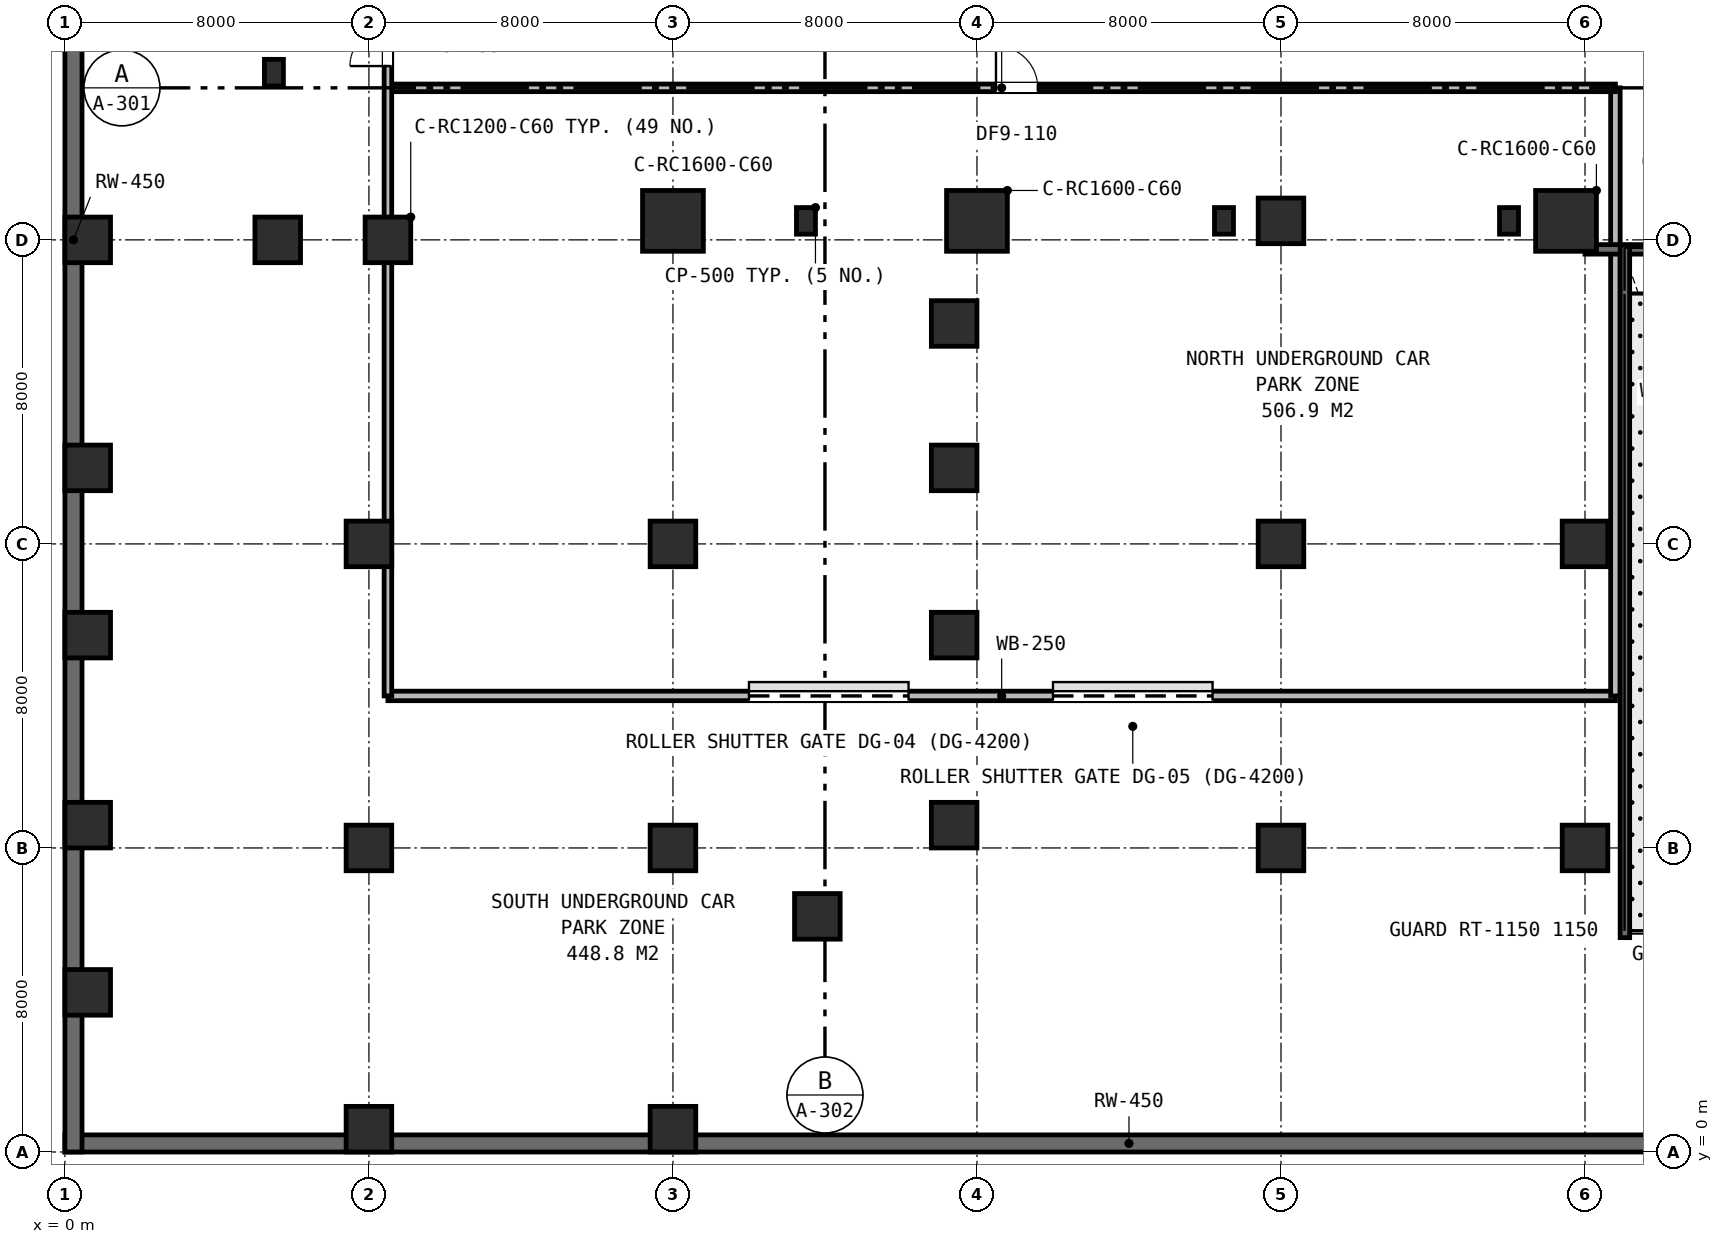
"""IFC4 building model, lengths in metres.
Left out: names, types, materials, properties, quantities, classifications, styles, units other than length and angle.
Written with IfcOpenShell. Run it as: python <this file> out.ifc"""

import sys

from ifc_helpers import new_model, si_unit, direction, frame, frame_2d, origin, origin_2d, place, context, subcontext, project, spatial, rectangle, extrude, element, fill, save


model = new_model("IFC4")
c1 = context("Model", 3, precision=1e-05, world=origin(), true_north=direction((0.0, 1.0)))
c2 = subcontext(c1, "Body", "Model", "MODEL_VIEW")
j1 = project(units=[si_unit("LENGTHUNIT", "METRE"), si_unit("PLANEANGLEUNIT", "RADIAN")], contexts=[c1])
p1 = place(None, origin())
s1 = spatial("IfcSite", under=j1, at=p1, CompositionType="ELEMENT")
p2 = place(p1, origin())
s2 = spatial("IfcBuilding", under=s1, at=p2, CompositionType="ELEMENT")
p3 = place(p2, frame((0.0, 0.0, -5.6)))
s3 = spatial("IfcBuildingStorey", under=s2, at=p3, CompositionType="ELEMENT", Elevation=-5.6)
p4 = place(p3, frame((0.0, 0.225, 0.0), z_axis=(0.0, 0.0, 1.0), x_axis=(1.0, 0.0, 0.0)))
e1 = element("IfcWall", 1, at=p4, inside=s3, PredefinedType="USERDEFINED", context=c2, shape_type="SweptSolid", body=[
    extrude(rectangle(XDim=56.0, YDim=0.45, at=frame_2d((28.0, 0.0))), origin(), (0.0, 0.0, 1.0), 5.6),
])
p5 = place(p3, frame((0.225, 0.0, 0.0), z_axis=(0.0, 0.0, 1.0), x_axis=(0.0, 1.0, 0.0)))
e2 = element("IfcWall", 2, at=p5, inside=s3, PredefinedType="USERDEFINED", context=c2, shape_type="SweptSolid", body=[
    extrude(rectangle(XDim=48.0, YDim=0.45, at=frame_2d((24.0, 0.0))), origin(), (0.0, 0.0, 1.0), 5.6),
])
p6 = place(p3, frame((8.5, 24.0, 0.0), z_axis=(0.0, 0.0, 1.0), x_axis=(1.0, 0.0, 0.0)))
e3 = element("IfcColumn", 3, at=p6, inside=s3, PredefinedType="COLUMN", context=c2, shape_type="SweptSolid", body=[
    extrude(rectangle(XDim=1.2, YDim=1.2, at=origin_2d()), origin(), (0.0, 0.0, 1.0), 5.6),
])
for number, where, z_axis, x_axis in (
    (4, (16.0, 24.5, 0.0), (0.0, 0.0, 1.0), (1.0, 0.0, 0.0)),
    (5, (24.0, 24.5, 0.0), (0.0, 0.0, 1.0), (1.0, 0.0, 0.0)),
):
    element("IfcColumn", number, at=place(p3, frame(where, z_axis=z_axis, x_axis=x_axis)), inside=s3, PredefinedType="COLUMN", context=c2, shape_type="SweptSolid", body=[
        extrude(rectangle(XDim=1.6, YDim=1.6, at=origin_2d()), origin(), (0.0, 0.0, 1.0), 5.6),
    ])
p7 = place(p3, frame((32.0, 24.5, 0.0), z_axis=(0.0, 0.0, 1.0), x_axis=(1.0, 0.0, 0.0)))
e6 = element("IfcColumn", 6, at=p7, inside=s3, PredefinedType="COLUMN", context=c2, shape_type="SweptSolid", body=[
    extrude(rectangle(XDim=1.2, YDim=1.2, at=origin_2d()), origin(), (0.0, 0.0, 1.0), 5.6),
])
p8 = place(p3, frame((39.5, 24.5, 0.0), z_axis=(0.0, 0.0, 1.0), x_axis=(1.0, 0.0, 0.0)))
e7 = element("IfcColumn", 7, at=p8, inside=s3, PredefinedType="COLUMN", context=c2, shape_type="SweptSolid", body=[
    extrude(rectangle(XDim=1.6, YDim=1.6, at=origin_2d()), origin(), (0.0, 0.0, 1.0), 5.6),
])
for number, where, z_axis, x_axis in (
    (8, (5.6, 24.0, 0.0), (0.0, 0.0, 1.0), (1.0, 0.0, 0.0)),
    (9, (0.6, 24.0, 0.0), (0.0, 0.0, 1.0), (1.0, 0.0, 0.0)),
    (10, (0.6, 8.6, 0.0), (0.0, 0.0, 1.0), (1.0, 0.0, 0.0)),
    (11, (0.6, 13.6, 0.0), (0.0, 0.0, 1.0), (1.0, 0.0, 0.0)),
    (12, (0.6, 18.0, 0.0), (0.0, 0.0, 1.0), (1.0, 0.0, 0.0)),
    (13, (0.6, 4.2, 0.0), (0.0, 0.0, 1.0), (1.0, 0.0, 0.0)),
    (14, (8.0, 0.6, 0.0), (0.0, 0.0, 1.0), (1.0, 0.0, 0.0)),
    (15, (16.0, 0.6, 0.0), (0.0, 0.0, 1.0), (1.0, 0.0, 0.0)),
    (16, (19.8, 6.2, 0.0), (0.0, 0.0, 1.0), (1.0, 0.0, 0.0)),
    (17, (23.4, 8.6, 0.0), (0.0, 0.0, 1.0), (1.0, 0.0, 0.0)),
    (18, (23.4, 13.6, 0.0), (0.0, 0.0, 1.0), (1.0, 0.0, 0.0)),
    (19, (23.4, 18.0, 0.0), (0.0, 0.0, 1.0), (1.0, 0.0, 0.0)),
    (20, (23.4, 21.8, 0.0), (0.0, 0.0, 1.0), (1.0, 0.0, 0.0)),
    (21, (8.0, 8.0, 0.0), (0.0, 0.0, 1.0), (1.0, 0.0, 0.0)),
    (22, (16.0, 8.0, 0.0), (0.0, 0.0, 1.0), (1.0, 0.0, 0.0)),
    (23, (32.0, 8.0, 0.0), (0.0, 0.0, 1.0), (1.0, 0.0, 0.0)),
    (24, (40.0, 8.0, 0.0), (0.0, 0.0, 1.0), (1.0, 0.0, 0.0)),
    (25, (8.0, 16.0, 0.0), (0.0, 0.0, 1.0), (1.0, 0.0, 0.0)),
    (26, (16.0, 16.0, 0.0), (0.0, 0.0, 1.0), (1.0, 0.0, 0.0)),
    (27, (32.0, 16.0, 0.0), (0.0, 0.0, 1.0), (1.0, 0.0, 0.0)),
    (28, (40.0, 16.0, 0.0), (0.0, 0.0, 1.0), (1.0, 0.0, 0.0)),
):
    element("IfcColumn", number, at=place(p3, frame(where, z_axis=z_axis, x_axis=x_axis)), inside=s3, PredefinedType="COLUMN", context=c2, shape_type="SweptSolid", body=[
        extrude(rectangle(XDim=1.2, YDim=1.2, at=origin_2d()), origin(), (0.0, 0.0, 1.0), 5.6),
    ])
p9 = place(p3, frame((8.5, 12.0, 0.0), z_axis=(0.0, 0.0, 1.0), x_axis=(1.0, 0.0, 0.0)))
e29 = element("IfcWall", 29, at=p9, inside=s3, PredefinedType="STANDARD", context=c2, shape_type="SweptSolid", body=[
    extrude(rectangle(XDim=32.3, YDim=0.25, at=frame_2d((16.15, 0.0))), origin(), (0.0, 0.0, 1.0), 5.27),
])
p10 = place(p9, frame((9.5, 0.0, 0.0)))
e30 = element("IfcOpeningElement", 30, at=p10, cuts=e29, PredefinedType="OPENING", context=c2, shape_type="SweptSolid", body=[
    extrude(rectangle(XDim=4.2, YDim=2.95, at=frame_2d((2.1, 1.475))), frame((0.0, 0.135, 0.0), z_axis=(0.0, -1.0, 0.0), x_axis=(1.0, 0.0, 0.0)), (0.0, 0.0, 1.0), 0.27),
])
p11 = place(p9, frame((17.5, 0.0, 0.0)))
e31 = element("IfcOpeningElement", 31, at=p11, cuts=e29, PredefinedType="OPENING", context=c2, shape_type="SweptSolid", body=[
    extrude(rectangle(XDim=4.2, YDim=2.95, at=frame_2d((2.1, 1.475))), frame((0.0, 0.135, 0.0), z_axis=(0.0, -1.0, 0.0), x_axis=(1.0, 0.0, 0.0)), (0.0, 0.0, 1.0), 0.27),
])
p12 = place(p3, frame((40.8, 12.0, 0.0), z_axis=(0.0, 0.0, 1.0), x_axis=(0.0, 1.0, 0.0)))
e32 = element("IfcWall", 32, at=p12, inside=s3, PredefinedType="STANDARD", context=c2, shape_type="SweptSolid", body=[
    extrude(rectangle(XDim=16.0, YDim=0.25, at=frame_2d((8.0, 0.0))), origin(), (0.0, 0.0, 1.0), 5.27),
])
p13 = place(p3, frame((8.5, 28.0, 0.0), z_axis=(0.0, 0.0, 1.0), x_axis=(1.0, 0.0, 0.0)))
e33 = element("IfcWall", 33, at=p13, inside=s3, PredefinedType="PARTITIONING", context=c2, shape_type="SweptSolid", body=[
    extrude(rectangle(XDim=32.3, YDim=0.2, at=frame_2d((16.15, 0.0))), origin(), (0.0, 0.0, 1.0), 4.66),
])
p14 = place(p13, frame((16.0, 0.0, 0.0)))
e34 = element("IfcOpeningElement", 34, at=p14, cuts=e33, PredefinedType="OPENING", context=c2, shape_type="SweptSolid", body=[
    extrude(rectangle(XDim=1.1, YDim=2.15, at=frame_2d((0.55, 1.075))), frame((0.0, 0.11, 0.0), z_axis=(0.0, -1.0, 0.0), x_axis=(1.0, 0.0, 0.0)), (0.0, 0.0, 1.0), 0.22),
])
p15 = place(p3, frame((8.5, 12.0, 0.0), z_axis=(0.0, 0.0, 1.0), x_axis=(0.0, 1.0, 0.0)))
e35 = element("IfcWall", 35, at=p15, inside=s3, PredefinedType="PARTITIONING", context=c2, shape_type="SweptSolid", body=[
    extrude(rectangle(XDim=35.45, YDim=0.2, at=frame_2d((17.725, 0.0))), origin(), (0.0, 0.0, 1.0), 4.66),
])
p16 = place(p15, frame((16.574, 0.0, 0.0)))
e36 = element("IfcOpeningElement", 36, at=p16, cuts=e35, PredefinedType="OPENING", context=c2, shape_type="SweptSolid", body=[
    extrude(rectangle(XDim=1.0, YDim=2.15, at=frame_2d((0.5, 1.075))), frame((0.0, 0.11, 0.0), z_axis=(0.0, -1.0, 0.0), x_axis=(1.0, 0.0, 0.0)), (0.0, 0.0, 1.0), 0.22),
])
p17 = place(p3, frame((40.0, 23.75, 0.0), z_axis=(0.0, 0.0, 1.0), x_axis=(1.0, 0.0, 0.0)))
e37 = element("IfcWall", 37, at=p17, inside=s3, PredefinedType="STANDARD", context=c2, shape_type="SweptSolid", body=[
    extrude(rectangle(XDim=8.0, YDim=0.25, at=frame_2d((4.0, 0.0))), origin(), (0.0, 0.0, 1.0), 5.28),
])
p18 = place(p3, frame((41.05, 5.64, 0.0), z_axis=(0.0, 0.0, 1.0), x_axis=(0.0, 1.0, 0.0)))
e38 = element("IfcWall", 38, at=p18, inside=s3, PredefinedType="STANDARD", context=c2, shape_type="SweptSolid", body=[
    extrude(rectangle(XDim=18.22, YDim=0.25, at=frame_2d((9.11, 0.0))), origin(), (0.0, 0.0, 1.0), 5.28),
])
for number, where, z_axis, x_axis in (
    (39, (19.5, 24.5, 0.0), (0.0, 0.0, 1.0), (1.0, 0.0, 0.0)),
    (40, (30.5, 24.5, 0.0), (0.0, 0.0, 1.0), (1.0, 0.0, 0.0)),
    (41, (38.0, 24.5, 0.0), (0.0, 0.0, 1.0), (1.0, 0.0, 0.0)),
    (42, (5.5, 28.4, 0.0), (0.0, 0.0, 1.0), (1.0, 0.0, 0.0)),
):
    element("IfcColumn", number, at=place(p3, frame(where, z_axis=z_axis, x_axis=x_axis)), inside=s3, PredefinedType="PILASTER", context=c2, shape_type="SweptSolid", body=[
        extrude(rectangle(XDim=0.5, YDim=0.7, at=origin_2d()), origin(), (0.0, 0.0, 1.0), 5.28),
    ])
p19 = place(p10, origin())
e43 = element("IfcDoor", 43, at=p19, inside=s3, OperationType="ROLLINGUP", PredefinedType="GATE", context=c2, shape_type="SweptSolid", body=[
    extrude(rectangle(XDim=4.2, YDim=2.95, at=frame_2d((2.1, 1.475))), frame((0.0, 0.025, 0.0), z_axis=(0.0, -1.0, 0.0), x_axis=(1.0, 0.0, 0.0)), (0.0, 0.0, 1.0), 0.05),
])
fill(e30, e43)
p20 = place(p11, origin())
e44 = element("IfcDoor", 44, at=p20, inside=s3, OperationType="ROLLINGUP", PredefinedType="GATE", context=c2, shape_type="SweptSolid", body=[
    extrude(rectangle(XDim=4.2, YDim=2.95, at=frame_2d((2.1, 1.475))), frame((0.0, 0.025, 0.0), z_axis=(0.0, -1.0, 0.0), x_axis=(1.0, 0.0, 0.0)), (0.0, 0.0, 1.0), 0.05),
])
fill(e31, e44)
p21 = place(p14, origin())
e45 = element("IfcDoor", 45, at=p21, inside=s3, OperationType="SINGLE_SWING_LEFT", PredefinedType="DOOR", context=c2, shape_type="SweptSolid", body=[
    extrude(rectangle(XDim=1.1, YDim=2.15, at=frame_2d((0.55, 1.075))), frame((0.0, 0.025, 0.0), z_axis=(0.0, -1.0, 0.0), x_axis=(1.0, 0.0, 0.0)), (0.0, 0.0, 1.0), 0.05),
])
fill(e34, e45)
p22 = place(p16, origin())
e46 = element("IfcDoor", 46, at=p22, inside=s3, OperationType="SINGLE_SWING_LEFT", PredefinedType="DOOR", context=c2, shape_type="SweptSolid", body=[
    extrude(rectangle(XDim=1.0, YDim=2.15, at=frame_2d((0.5, 1.075))), frame((0.0, 0.025, 0.0), z_axis=(0.0, -1.0, 0.0), x_axis=(1.0, 0.0, 0.0)), (0.0, 0.0, 1.0), 0.05),
])
fill(e36, e46)
save(model, sys.argv[1])
